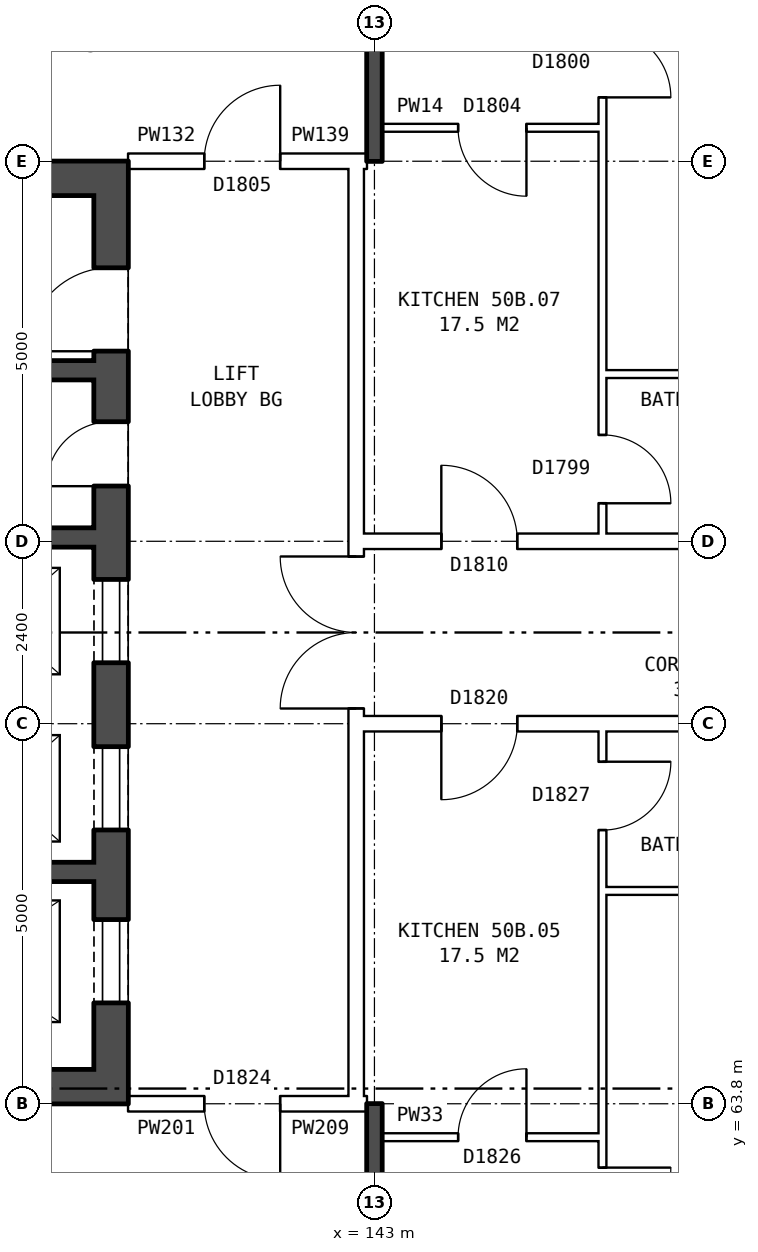
"""IFC4 building model, lengths in metres.
Left out: names, types, materials, properties, quantities, classifications, styles, units other than length and angle.
Written with IfcOpenShell. Run it as: python <this file> out.ifc"""

import sys

from ifc_helpers import new_model, si_unit, direction, frame, frame_2d, origin, place, context, subcontext, project, spatial, rectangle, extrude, element, fill, save


model = new_model("IFC4")
c1 = context("Model", 3, precision=1e-05, world=origin(), true_north=direction((0.0, 1.0)))
c2 = subcontext(c1, "Body", "Model", "MODEL_VIEW")
j1 = project(units=[si_unit("LENGTHUNIT", "METRE"), si_unit("PLANEANGLEUNIT", "RADIAN")], contexts=[c1])
p1 = place(None, origin())
s1 = spatial("IfcSite", under=j1, at=p1, CompositionType="ELEMENT")
p2 = place(p1, origin())
s2 = spatial("IfcBuilding", under=s1, at=p2, CompositionType="ELEMENT")
p3 = place(p2, frame((0.0, 0.0, 178.9)))
s3 = spatial("IfcBuildingStorey", under=s2, at=p3, CompositionType="ELEMENT", Elevation=178.9)
p4 = place(p3, frame((139.535, 63.8, 0.0), z_axis=(0.0, 0.0, 1.0), x_axis=(0.0, 1.0, 0.0)))
e1 = element("IfcWall", 1, at=p4, inside=s3, PredefinedType="SHEAR", context=c2, shape_type="SweptSolid", body=[
    extrude(rectangle(XDim=12.4, YDim=0.45, at=frame_2d((6.2, 0.0))), origin(), (0.0, 0.0, 1.0), 2.85),
])
p5 = place(p4, frame((1.325, 0.0, 0.0)))
e2 = element("IfcOpeningElement", 2, at=p5, cuts=e1, PredefinedType="OPENING", context=c2, shape_type="SweptSolid", body=[
    extrude(rectangle(XDim=1.1, YDim=2.1, at=frame_2d((0.55, 1.05))), frame((0.0, 0.235, 0.0), z_axis=(0.0, -1.0, 0.0), x_axis=(1.0, 0.0, 0.0)), (0.0, 0.0, 1.0), 0.47),
])
p6 = place(p4, frame((3.6, 0.0, 0.0)))
e3 = element("IfcOpeningElement", 3, at=p6, cuts=e1, PredefinedType="OPENING", context=c2, shape_type="SweptSolid", body=[
    extrude(rectangle(XDim=1.1, YDim=2.1, at=frame_2d((0.55, 1.05))), frame((0.0, 0.235, 0.0), z_axis=(0.0, -1.0, 0.0), x_axis=(1.0, 0.0, 0.0)), (0.0, 0.0, 1.0), 0.47),
])
p7 = place(p4, frame((5.8, 0.0, 0.0)))
e4 = element("IfcOpeningElement", 4, at=p7, cuts=e1, PredefinedType="OPENING", context=c2, shape_type="SweptSolid", body=[
    extrude(rectangle(XDim=1.1, YDim=2.1, at=frame_2d((0.55, 1.05))), frame((0.0, 0.235, 0.0), z_axis=(0.0, -1.0, 0.0), x_axis=(1.0, 0.0, 0.0)), (0.0, 0.0, 1.0), 0.47),
])
p8 = place(p4, frame((9.9, 0.0, 0.0)))
e5 = element("IfcOpeningElement", 5, at=p8, cuts=e1, PredefinedType="OPENING", context=c2, shape_type="SweptSolid", body=[
    extrude(rectangle(XDim=1.1, YDim=2.1, at=frame_2d((0.55, 1.05))), frame((0.0, 0.235, 0.0), z_axis=(0.0, -1.0, 0.0), x_axis=(1.0, 0.0, 0.0)), (0.0, 0.0, 1.0), 0.47),
])
p9 = place(p4, frame((8.125, 0.0, 0.0)))
e6 = element("IfcOpeningElement", 6, at=p9, cuts=e1, PredefinedType="OPENING", context=c2, shape_type="SweptSolid", body=[
    extrude(rectangle(XDim=0.85, YDim=2.1, at=frame_2d((0.425, 1.05))), frame((0.0, 0.235, 0.0), z_axis=(0.0, -1.0, 0.0), x_axis=(1.0, 0.0, 0.0)), (0.0, 0.0, 1.0), 0.47),
])
for number, where, z_axis, x_axis in (
    (7, (139.31, 64.025, 0.0), (0.0, 0.0, 1.0), (-1.0, 0.0, 0.0)),
    (8, (139.31, 75.975, 0.0), (0.0, 0.0, 1.0), (-1.0, 0.0, 0.0)),
):
    element("IfcWall", number, at=place(p3, frame(where, z_axis=z_axis, x_axis=x_axis)), inside=s3, PredefinedType="SHEAR", context=c2, shape_type="SweptSolid", body=[
        extrude(rectangle(XDim=7.5, YDim=0.45, at=frame_2d((3.75, 0.0))), origin(), (0.0, 0.0, 1.0), 2.85),
    ])
p10 = place(p3, frame((139.31, 66.85, 0.0), z_axis=(0.0, 0.0, 1.0), x_axis=(-1.0, 0.0, 0.0)))
e9 = element("IfcWall", 9, at=p10, inside=s3, PredefinedType="SHEAR", context=c2, shape_type="SweptSolid", body=[
    extrude(rectangle(XDim=4.675, YDim=0.25, at=frame_2d((2.337, 0.0))), origin(), (0.0, 0.0, 1.0), 2.85),
])
p11 = place(p3, frame((139.31, 71.25, 0.0), z_axis=(0.0, 0.0, 1.0), x_axis=(-1.0, 0.0, 0.0)))
e10 = element("IfcWall", 10, at=p11, inside=s3, PredefinedType="SHEAR", context=c2, shape_type="SweptSolid", body=[
    extrude(rectangle(XDim=7.5, YDim=0.25, at=frame_2d((3.75, 0.0))), origin(), (0.0, 0.0, 1.0), 2.85),
])
p12 = place(p11, frame((5.075, 0.0, 0.0)))
e11 = element("IfcOpeningElement", 11, at=p12, cuts=e10, PredefinedType="OPENING", context=c2, shape_type="SweptSolid", body=[
    extrude(rectangle(XDim=1.1, YDim=2.1, at=frame_2d((0.55, 1.05))), frame((0.0, 0.135, 0.0), z_axis=(0.0, -1.0, 0.0), x_axis=(1.0, 0.0, 0.0)), (0.0, 0.0, 1.0), 0.27),
])
p13 = place(p11, frame((2.925, 0.0, 0.0)))
e12 = element("IfcOpeningElement", 12, at=p13, cuts=e10, PredefinedType="OPENING", context=c2, shape_type="SweptSolid", body=[
    extrude(rectangle(XDim=0.85, YDim=2.1, at=frame_2d((0.425, 1.05))), frame((0.0, 0.135, 0.0), z_axis=(0.0, -1.0, 0.0), x_axis=(1.0, 0.0, 0.0)), (0.0, 0.0, 1.0), 0.27),
])
p14 = place(p3, frame((139.31, 73.45, 0.0), z_axis=(0.0, 0.0, 1.0), x_axis=(-1.0, 0.0, 0.0)))
e13 = element("IfcWall", 13, at=p14, inside=s3, PredefinedType="SHEAR", context=c2, shape_type="SweptSolid", body=[
    extrude(rectangle(XDim=2.475, YDim=0.25, at=frame_2d((1.238, 0.0))), origin(), (0.0, 0.0, 1.0), 2.85),
])
p15 = place(p3, frame((142.76, 63.9, 0.0), z_axis=(0.0, 0.0, 1.0), x_axis=(0.0, 1.0, 0.0)))
e14 = element("IfcWall", 14, at=p15, inside=s3, PredefinedType="PARTITIONING", context=c2, shape_type="SweptSolid", body=[
    extrude(rectangle(XDim=12.2, YDim=0.2, at=frame_2d((6.1, 0.0))), origin(), (0.0, 0.0, 1.0), 2.85),
])
p16 = place(p15, frame((5.1, 0.0, 0.0)))
e15 = element("IfcOpeningElement", 15, at=p16, cuts=e14, PredefinedType="OPENING", context=c2, shape_type="SweptSolid", body=[
    extrude(rectangle(XDim=2.0, YDim=2.1, at=frame_2d((1.0, 1.05))), frame((0.0, 0.11, 0.0), z_axis=(0.0, -1.0, 0.0), x_axis=(1.0, 0.0, 0.0)), (0.0, 0.0, 1.0), 0.22),
])
p17 = place(p3, frame((143.1, 63.36, 0.0), z_axis=(0.0, 0.0, 1.0), x_axis=(1.0, 0.0, 0.0)))
e16 = element("IfcWall", 16, at=p17, inside=s3, PredefinedType="PARTITIONING", context=c2, shape_type="SweptSolid", body=[
    extrude(rectangle(XDim=2.9, YDim=0.1, at=frame_2d((1.45, 0.0))), origin(), (0.0, 0.0, 1.0), 2.85),
])
p18 = place(p17, frame((1.0, 0.0, 0.0)))
e17 = element("IfcOpeningElement", 17, at=p18, cuts=e16, PredefinedType="OPENING", context=c2, shape_type="SweptSolid", body=[
    extrude(rectangle(XDim=0.9, YDim=2.1, at=frame_2d((0.45, 1.05))), frame((0.0, 0.06, 0.0), z_axis=(0.0, -1.0, 0.0), x_axis=(1.0, 0.0, 0.0)), (0.0, 0.0, 1.0), 0.12),
])
p19 = place(p3, frame((139.76, 63.8, 0.0), z_axis=(0.0, 0.0, 1.0), x_axis=(1.0, 0.0, 0.0)))
e18 = element("IfcWall", 18, at=p19, inside=s3, PredefinedType="PARTITIONING", context=c2, shape_type="SweptSolid", body=[
    extrude(rectangle(XDim=3.0, YDim=0.2, at=frame_2d((1.5, 0.0))), origin(), (0.0, 0.0, 1.0), 2.85),
])
p20 = place(p19, frame((1.0, 0.0, 0.0)))
e19 = element("IfcOpeningElement", 19, at=p20, cuts=e18, PredefinedType="OPENING", context=c2, shape_type="SweptSolid", body=[
    extrude(rectangle(XDim=1.0, YDim=2.1, at=frame_2d((0.5, 1.05))), frame((0.0, 0.11, 0.0), z_axis=(0.0, -1.0, 0.0), x_axis=(1.0, 0.0, 0.0)), (0.0, 0.0, 1.0), 0.22),
])
p21 = place(p3, frame((142.76, 63.8, 0.0), z_axis=(0.0, 0.0, 1.0), x_axis=(1.0, 0.0, 0.0)))
e20 = element("IfcWall", 20, at=p21, inside=s3, PredefinedType="PARTITIONING", context=c2, shape_type="SweptSolid", body=[
    extrude(rectangle(XDim=0.14, YDim=0.2, at=frame_2d((0.07, 0.0))), origin(), (0.0, 0.0, 1.0), 2.85),
])
p22 = place(p3, frame((146.0, 66.6, 0.0), z_axis=(0.0, 0.0, 1.0), x_axis=(1.0, 0.0, 0.0)))
e21 = element("IfcWall", 21, at=p22, inside=s3, PredefinedType="PARTITIONING", context=c2, shape_type="SweptSolid", body=[
    extrude(rectangle(XDim=2.9, YDim=0.1, at=frame_2d((1.45, 0.0))), origin(), (0.0, 0.0, 1.0), 2.85),
])
p23 = place(p3, frame((142.76, 68.8, 0.0), z_axis=(0.0, 0.0, 1.0), x_axis=(1.0, 0.0, 0.0)))
e22 = element("IfcWall", 22, at=p23, inside=s3, PredefinedType="PARTITIONING", context=c2, shape_type="SweptSolid", body=[
    extrude(rectangle(XDim=14.48, YDim=0.2, at=frame_2d((7.24, 0.0))), origin(), (0.0, 0.0, 1.0), 2.85),
])
p24 = place(p23, frame((1.12, 0.0, 0.0)))
e23 = element("IfcOpeningElement", 23, at=p24, cuts=e22, PredefinedType="OPENING", context=c2, shape_type="SweptSolid", body=[
    extrude(rectangle(XDim=1.0, YDim=2.1, at=frame_2d((0.5, 1.05))), frame((0.0, 0.11, 0.0), z_axis=(0.0, -1.0, 0.0), x_axis=(1.0, 0.0, 0.0)), (0.0, 0.0, 1.0), 0.22),
])
p25 = place(p23, frame((10.24, 0.0, 0.0)))
e24 = element("IfcOpeningElement", 24, at=p25, cuts=e22, PredefinedType="OPENING", context=c2, shape_type="SweptSolid", body=[
    extrude(rectangle(XDim=1.0, YDim=2.1, at=frame_2d((0.5, 1.05))), frame((0.0, 0.11, 0.0), z_axis=(0.0, -1.0, 0.0), x_axis=(1.0, 0.0, 0.0)), (0.0, 0.0, 1.0), 0.22),
])
p26 = place(p3, frame((142.76, 71.2, 0.0), z_axis=(0.0, 0.0, 1.0), x_axis=(1.0, 0.0, 0.0)))
e25 = element("IfcWall", 25, at=p26, inside=s3, PredefinedType="PARTITIONING", context=c2, shape_type="SweptSolid", body=[
    extrude(rectangle(XDim=14.48, YDim=0.2, at=frame_2d((7.24, 0.0))), origin(), (0.0, 0.0, 1.0), 2.85),
])
p27 = place(p26, frame((1.12, 0.0, 0.0)))
e26 = element("IfcOpeningElement", 26, at=p27, cuts=e25, PredefinedType="OPENING", context=c2, shape_type="SweptSolid", body=[
    extrude(rectangle(XDim=1.0, YDim=2.1, at=frame_2d((0.5, 1.05))), frame((0.0, 0.11, 0.0), z_axis=(0.0, -1.0, 0.0), x_axis=(1.0, 0.0, 0.0)), (0.0, 0.0, 1.0), 0.22),
])
p28 = place(p26, frame((7.24, 0.0, 0.0)))
e27 = element("IfcOpeningElement", 27, at=p28, cuts=e25, PredefinedType="OPENING", context=c2, shape_type="SweptSolid", body=[
    extrude(rectangle(XDim=1.0, YDim=2.1, at=frame_2d((0.5, 1.05))), frame((0.0, 0.11, 0.0), z_axis=(0.0, -1.0, 0.0), x_axis=(1.0, 0.0, 0.0)), (0.0, 0.0, 1.0), 0.22),
])
p29 = place(p3, frame((146.0, 73.4, 0.0), z_axis=(0.0, 0.0, 1.0), x_axis=(1.0, 0.0, 0.0)))
e28 = element("IfcWall", 28, at=p29, inside=s3, PredefinedType="PARTITIONING", context=c2, shape_type="SweptSolid", body=[
    extrude(rectangle(XDim=2.9, YDim=0.1, at=frame_2d((1.45, 0.0))), origin(), (0.0, 0.0, 1.0), 2.85),
])
p30 = place(p3, frame((139.76, 76.2, 0.0), z_axis=(0.0, 0.0, 1.0), x_axis=(1.0, 0.0, 0.0)))
e29 = element("IfcWall", 29, at=p30, inside=s3, PredefinedType="PARTITIONING", context=c2, shape_type="SweptSolid", body=[
    extrude(rectangle(XDim=3.0, YDim=0.2, at=frame_2d((1.5, 0.0))), origin(), (0.0, 0.0, 1.0), 2.85),
])
p31 = place(p30, frame((1.0, 0.0, 0.0)))
e30 = element("IfcOpeningElement", 30, at=p31, cuts=e29, PredefinedType="OPENING", context=c2, shape_type="SweptSolid", body=[
    extrude(rectangle(XDim=1.0, YDim=2.1, at=frame_2d((0.5, 1.05))), frame((0.0, 0.11, 0.0), z_axis=(0.0, -1.0, 0.0), x_axis=(1.0, 0.0, 0.0)), (0.0, 0.0, 1.0), 0.22),
])
p32 = place(p3, frame((142.76, 76.2, 0.0), z_axis=(0.0, 0.0, 1.0), x_axis=(1.0, 0.0, 0.0)))
e31 = element("IfcWall", 31, at=p32, inside=s3, PredefinedType="PARTITIONING", context=c2, shape_type="SweptSolid", body=[
    extrude(rectangle(XDim=0.14, YDim=0.2, at=frame_2d((0.07, 0.0))), origin(), (0.0, 0.0, 1.0), 2.85),
])
p33 = place(p3, frame((143.1, 76.64, 0.0), z_axis=(0.0, 0.0, 1.0), x_axis=(1.0, 0.0, 0.0)))
e32 = element("IfcWall", 32, at=p33, inside=s3, PredefinedType="PARTITIONING", context=c2, shape_type="SweptSolid", body=[
    extrude(rectangle(XDim=2.9, YDim=0.1, at=frame_2d((1.45, 0.0))), origin(), (0.0, 0.0, 1.0), 2.85),
])
p34 = place(p33, frame((1.0, 0.0, 0.0)))
e33 = element("IfcOpeningElement", 33, at=p34, cuts=e32, PredefinedType="OPENING", context=c2, shape_type="SweptSolid", body=[
    extrude(rectangle(XDim=0.9, YDim=2.1, at=frame_2d((0.45, 1.05))), frame((0.0, 0.06, 0.0), z_axis=(0.0, -1.0, 0.0), x_axis=(1.0, 0.0, 0.0)), (0.0, 0.0, 1.0), 0.12),
])
for number, where, z_axis, x_axis in (
    (34, (143.0, 54.36, 0.0), (0.0, 0.0, 1.0), (0.0, 1.0, 0.0)),
    (35, (143.0, 76.2, 0.0), (0.0, 0.0, 1.0), (0.0, 1.0, 0.0)),
):
    element("IfcWall", number, at=place(p3, frame(where, z_axis=z_axis, x_axis=x_axis)), inside=s3, PredefinedType="SOLIDWALL", context=c2, shape_type="SweptSolid", body=[
        extrude(rectangle(XDim=9.44, YDim=0.2, at=frame_2d((4.72, 0.0))), origin(), (0.0, 0.0, 1.0), 2.85),
    ])
p35 = place(p3, frame((146.0, 54.36, 0.0), z_axis=(0.0, 0.0, 1.0), x_axis=(0.0, 1.0, 0.0)))
e36 = element("IfcWall", 36, at=p35, inside=s3, PredefinedType="PARTITIONING", context=c2, shape_type="SweptSolid", body=[
    extrude(rectangle(XDim=14.34, YDim=0.1, at=frame_2d((7.17, 0.0))), origin(), (0.0, 0.0, 1.0), 2.85),
])
p36 = place(p35, frame((7.7, 0.0, 0.0)))
e37 = element("IfcOpeningElement", 37, at=p36, cuts=e36, PredefinedType="OPENING", context=c2, shape_type="SweptSolid", body=[
    extrude(rectangle(XDim=0.9, YDim=2.1, at=frame_2d((0.45, 1.05))), frame((0.0, 0.06, 0.0), z_axis=(0.0, -1.0, 0.0), x_axis=(1.0, 0.0, 0.0)), (0.0, 0.0, 1.0), 0.12),
])
p37 = place(p35, frame((13.04, 0.0, 0.0)))
e38 = element("IfcOpeningElement", 38, at=p37, cuts=e36, PredefinedType="OPENING", context=c2, shape_type="SweptSolid", body=[
    extrude(rectangle(XDim=0.9, YDim=2.1, at=frame_2d((0.45, 1.05))), frame((0.0, 0.06, 0.0), z_axis=(0.0, -1.0, 0.0), x_axis=(1.0, 0.0, 0.0)), (0.0, 0.0, 1.0), 0.12),
])
p38 = place(p3, frame((146.0, 71.3, 0.0), z_axis=(0.0, 0.0, 1.0), x_axis=(0.0, 1.0, 0.0)))
e39 = element("IfcWall", 39, at=p38, inside=s3, PredefinedType="PARTITIONING", context=c2, shape_type="SweptSolid", body=[
    extrude(rectangle(XDim=14.34, YDim=0.1, at=frame_2d((7.17, 0.0))), origin(), (0.0, 0.0, 1.0), 2.85),
])
p39 = place(p38, frame((5.74, 0.0, 0.0)))
e40 = element("IfcOpeningElement", 40, at=p39, cuts=e39, PredefinedType="OPENING", context=c2, shape_type="SweptSolid", body=[
    extrude(rectangle(XDim=0.9, YDim=2.1, at=frame_2d((0.45, 1.05))), frame((0.0, 0.06, 0.0), z_axis=(0.0, -1.0, 0.0), x_axis=(1.0, 0.0, 0.0)), (0.0, 0.0, 1.0), 0.12),
])
p40 = place(p38, frame((0.4, 0.0, 0.0)))
e41 = element("IfcOpeningElement", 41, at=p40, cuts=e39, PredefinedType="OPENING", context=c2, shape_type="SweptSolid", body=[
    extrude(rectangle(XDim=0.9, YDim=2.1, at=frame_2d((0.45, 1.05))), frame((0.0, 0.06, 0.0), z_axis=(0.0, -1.0, 0.0), x_axis=(1.0, 0.0, 0.0)), (0.0, 0.0, 1.0), 0.12),
])
p41 = place(p5, origin())
e42 = element("IfcDoor", 42, at=p41, inside=s3, OperationType="DOUBLE_DOOR_SLIDING", PredefinedType="DOOR", context=c2, shape_type="SweptSolid", body=[
    extrude(rectangle(XDim=1.1, YDim=2.1, at=frame_2d((0.55, 1.05))), frame((0.0, 0.21, 0.0), z_axis=(0.0, -1.0, 0.0), x_axis=(1.0, 0.0, 0.0)), (0.0, 0.0, 1.0), 0.05),
])
fill(e2, e42)
p42 = place(p6, origin())
e43 = element("IfcDoor", 43, at=p42, inside=s3, OperationType="DOUBLE_DOOR_SLIDING", PredefinedType="DOOR", context=c2, shape_type="SweptSolid", body=[
    extrude(rectangle(XDim=1.1, YDim=2.1, at=frame_2d((0.55, 1.05))), frame((0.0, 0.21, 0.0), z_axis=(0.0, -1.0, 0.0), x_axis=(1.0, 0.0, 0.0)), (0.0, 0.0, 1.0), 0.05),
])
fill(e3, e43)
p43 = place(p7, origin())
e44 = element("IfcDoor", 44, at=p43, inside=s3, OperationType="DOUBLE_DOOR_SLIDING", PredefinedType="DOOR", context=c2, shape_type="SweptSolid", body=[
    extrude(rectangle(XDim=1.1, YDim=2.1, at=frame_2d((0.55, 1.05))), frame((0.0, 0.21, 0.0), z_axis=(0.0, -1.0, 0.0), x_axis=(1.0, 0.0, 0.0)), (0.0, 0.0, 1.0), 0.05),
])
fill(e4, e44)
p44 = place(p8, origin())
e45 = element("IfcDoor", 45, at=p44, inside=s3, OperationType="SINGLE_SWING_LEFT", PredefinedType="DOOR", context=c2, shape_type="SweptSolid", body=[
    extrude(rectangle(XDim=1.1, YDim=2.1, at=frame_2d((0.55, 1.05))), frame((0.0, 0.21, 0.0), z_axis=(0.0, -1.0, 0.0), x_axis=(1.0, 0.0, 0.0)), (0.0, 0.0, 1.0), 0.05),
])
fill(e5, e45)
p45 = place(p9, origin())
e46 = element("IfcDoor", 46, at=p45, inside=s3, OperationType="SINGLE_SWING_LEFT", PredefinedType="DOOR", context=c2, shape_type="SweptSolid", body=[
    extrude(rectangle(XDim=0.85, YDim=2.1, at=frame_2d((0.425, 1.05))), frame((0.0, 0.21, 0.0), z_axis=(0.0, -1.0, 0.0), x_axis=(1.0, 0.0, 0.0)), (0.0, 0.0, 1.0), 0.05),
])
fill(e6, e46)
p46 = place(p16, origin())
e47 = element("IfcDoor", 47, at=p46, inside=s3, OperationType="DOUBLE_DOOR_SINGLE_SWING", PredefinedType="DOOR", context=c2, shape_type="SweptSolid", body=[
    extrude(rectangle(XDim=2.0, YDim=2.1, at=frame_2d((1.0, 1.05))), frame((0.0, 0.025, 0.0), z_axis=(0.0, -1.0, 0.0), x_axis=(1.0, 0.0, 0.0)), (0.0, 0.0, 1.0), 0.05),
])
fill(e15, e47)
p47 = place(p20, frame((1.0, 0.0, 0.0), z_axis=(0.0, 0.0, 1.0), x_axis=(-1.0, 0.0, 0.0)))
e48 = element("IfcDoor", 48, at=p47, inside=s3, OperationType="SINGLE_SWING_LEFT", PredefinedType="DOOR", context=c2, shape_type="SweptSolid", body=[
    extrude(rectangle(XDim=1.0, YDim=2.1, at=frame_2d((0.5, 1.05))), frame((0.0, 0.025, 0.0), z_axis=(0.0, -1.0, 0.0), x_axis=(1.0, 0.0, 0.0)), (0.0, 0.0, 1.0), 0.05),
])
fill(e19, e48)
p48 = place(p31, origin())
e49 = element("IfcDoor", 49, at=p48, inside=s3, OperationType="SINGLE_SWING_RIGHT", PredefinedType="DOOR", context=c2, shape_type="SweptSolid", body=[
    extrude(rectangle(XDim=1.0, YDim=2.1, at=frame_2d((0.5, 1.05))), frame((0.0, 0.025, 0.0), z_axis=(0.0, -1.0, 0.0), x_axis=(1.0, 0.0, 0.0)), (0.0, 0.0, 1.0), 0.05),
])
fill(e30, e49)
p49 = place(p36, frame((0.9, 0.0, 0.0), z_axis=(0.0, 0.0, 1.0), x_axis=(-1.0, 0.0, 0.0)))
e50 = element("IfcDoor", 50, at=p49, inside=s3, OperationType="SINGLE_SWING_LEFT", PredefinedType="DOOR", context=c2, shape_type="SweptSolid", body=[
    extrude(rectangle(XDim=0.9, YDim=2.1, at=frame_2d((0.45, 1.05))), frame((0.0, 0.025, 0.0), z_axis=(0.0, -1.0, 0.0), x_axis=(1.0, 0.0, 0.0)), (0.0, 0.0, 1.0), 0.05),
])
fill(e37, e50)
p50 = place(p24, frame((1.0, 0.0, 0.0), z_axis=(0.0, 0.0, 1.0), x_axis=(-1.0, 0.0, 0.0)))
e51 = element("IfcDoor", 51, at=p50, inside=s3, OperationType="SINGLE_SWING_RIGHT", PredefinedType="DOOR", context=c2, shape_type="SweptSolid", body=[
    extrude(rectangle(XDim=1.0, YDim=2.1, at=frame_2d((0.5, 1.05))), frame((0.0, 0.025, 0.0), z_axis=(0.0, -1.0, 0.0), x_axis=(1.0, 0.0, 0.0)), (0.0, 0.0, 1.0), 0.05),
])
fill(e23, e51)
p51 = place(p18, origin())
e52 = element("IfcDoor", 52, at=p51, inside=s3, OperationType="SINGLE_SWING_RIGHT", PredefinedType="DOOR", context=c2, shape_type="SweptSolid", body=[
    extrude(rectangle(XDim=0.9, YDim=2.1, at=frame_2d((0.45, 1.05))), frame((0.0, 0.025, 0.0), z_axis=(0.0, -1.0, 0.0), x_axis=(1.0, 0.0, 0.0)), (0.0, 0.0, 1.0), 0.05),
])
fill(e17, e52)
p52 = place(p37, frame((0.9, 0.0, 0.0), z_axis=(0.0, 0.0, 1.0), x_axis=(-1.0, 0.0, 0.0)))
e53 = element("IfcDoor", 53, at=p52, inside=s3, OperationType="SINGLE_SWING_LEFT", PredefinedType="DOOR", context=c2, shape_type="SweptSolid", body=[
    extrude(rectangle(XDim=0.9, YDim=2.1, at=frame_2d((0.45, 1.05))), frame((0.0, 0.025, 0.0), z_axis=(0.0, -1.0, 0.0), x_axis=(1.0, 0.0, 0.0)), (0.0, 0.0, 1.0), 0.05),
])
fill(e38, e53)
p53 = place(p39, frame((0.9, 0.0, 0.0), z_axis=(0.0, 0.0, 1.0), x_axis=(-1.0, 0.0, 0.0)))
e54 = element("IfcDoor", 54, at=p53, inside=s3, OperationType="SINGLE_SWING_RIGHT", PredefinedType="DOOR", context=c2, shape_type="SweptSolid", body=[
    extrude(rectangle(XDim=0.9, YDim=2.1, at=frame_2d((0.45, 1.05))), frame((0.0, 0.025, 0.0), z_axis=(0.0, -1.0, 0.0), x_axis=(1.0, 0.0, 0.0)), (0.0, 0.0, 1.0), 0.05),
])
fill(e40, e54)
p54 = place(p27, origin())
e55 = element("IfcDoor", 55, at=p54, inside=s3, OperationType="SINGLE_SWING_LEFT", PredefinedType="DOOR", context=c2, shape_type="SweptSolid", body=[
    extrude(rectangle(XDim=1.0, YDim=2.1, at=frame_2d((0.5, 1.05))), frame((0.0, 0.025, 0.0), z_axis=(0.0, -1.0, 0.0), x_axis=(1.0, 0.0, 0.0)), (0.0, 0.0, 1.0), 0.05),
])
fill(e26, e55)
p55 = place(p34, frame((0.9, 0.0, 0.0), z_axis=(0.0, 0.0, 1.0), x_axis=(-1.0, 0.0, 0.0)))
e56 = element("IfcDoor", 56, at=p55, inside=s3, OperationType="SINGLE_SWING_LEFT", PredefinedType="DOOR", context=c2, shape_type="SweptSolid", body=[
    extrude(rectangle(XDim=0.9, YDim=2.1, at=frame_2d((0.45, 1.05))), frame((0.0, 0.025, 0.0), z_axis=(0.0, -1.0, 0.0), x_axis=(1.0, 0.0, 0.0)), (0.0, 0.0, 1.0), 0.05),
])
fill(e33, e56)
p56 = place(p40, frame((0.9, 0.0, 0.0), z_axis=(0.0, 0.0, 1.0), x_axis=(-1.0, 0.0, 0.0)))
e57 = element("IfcDoor", 57, at=p56, inside=s3, OperationType="SINGLE_SWING_RIGHT", PredefinedType="DOOR", context=c2, shape_type="SweptSolid", body=[
    extrude(rectangle(XDim=0.9, YDim=2.1, at=frame_2d((0.45, 1.05))), frame((0.0, 0.025, 0.0), z_axis=(0.0, -1.0, 0.0), x_axis=(1.0, 0.0, 0.0)), (0.0, 0.0, 1.0), 0.05),
])
fill(e41, e57)
save(model, sys.argv[1])
